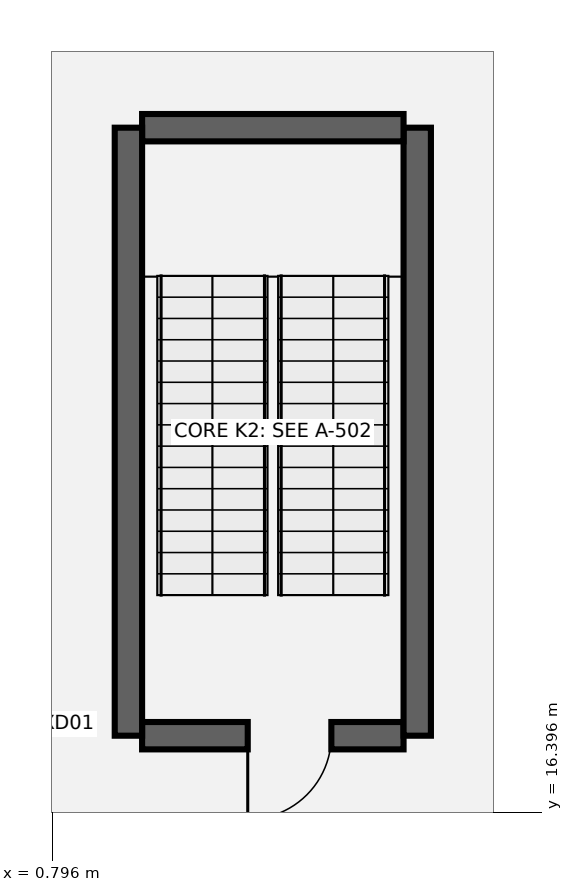
"""IFC4 building model, lengths in metres.
Left out: names, types, materials, properties, quantities, classifications, styles, units other than length and angle.
Written with IfcOpenShell. Run it as: python <this file> out.ifc"""

import sys

from ifc_helpers import new_model, si_unit, direction, frame, frame_2d, origin, place, context, subcontext, project, spatial, rectangle, extrude, element, fill, save


model = new_model("IFC4")
c1 = context("Model", 3, precision=1e-05, world=origin(), true_north=direction((0.0, 1.0)))
c2 = subcontext(c1, "Body", "Model", "MODEL_VIEW")
j1 = project(units=[si_unit("LENGTHUNIT", "METRE"), si_unit("PLANEANGLEUNIT", "RADIAN")], contexts=[c1])
p1 = place(None, origin())
s1 = spatial("IfcSite", under=j1, at=p1, CompositionType="ELEMENT")
p2 = place(p1, origin())
s2 = spatial("IfcBuilding", under=s1, at=p2, CompositionType="ELEMENT")
p3 = place(p2, origin())
s3 = spatial("IfcBuildingStorey", under=s2, at=p3, CompositionType="ELEMENT", Elevation=0.0)
p4 = place(p3, frame((5.42, 17.4, 0.0), z_axis=(0.0, 0.0, 1.0), x_axis=(-1.0, 0.0, 0.0)))
e1 = element("IfcWall", 1, at=p4, inside=s3, PredefinedType="SHEAR", context=c2, shape_type="SweptSolid", body=[
    extrude(rectangle(XDim=3.44, YDim=0.36, at=frame_2d((1.72, 0.0))), origin(), (0.0, 0.0, 1.0), 5.12),
])
p5 = place(p4, frame((0.95, 0.0, 0.0)))
e2 = element("IfcOpeningElement", 2, at=p5, cuts=e1, PredefinedType="OPENING", context=c2, shape_type="SweptSolid", body=[
    extrude(rectangle(XDim=1.1, YDim=2.15, at=frame_2d((0.55, 1.075))), frame((0.0, 0.19, 0.0), z_axis=(0.0, -1.0, 0.0), x_axis=(1.0, 0.0, 0.0)), (0.0, 0.0, 1.0), 0.38),
])
p6 = place(p3, frame((5.6, 17.4, 0.0), z_axis=(0.0, 0.0, 1.0), x_axis=(0.0, 1.0, 0.0)))
e3 = element("IfcWall", 3, at=p6, inside=s3, PredefinedType="SHEAR", context=c2, shape_type="SweptSolid", body=[
    extrude(rectangle(XDim=8.0, YDim=0.36, at=frame_2d((4.0, 0.0))), origin(), (0.0, 0.0, 1.0), 5.12),
])
p7 = place(p3, frame((5.42, 25.4, 0.0), z_axis=(0.0, 0.0, 1.0), x_axis=(-1.0, 0.0, 0.0)))
e4 = element("IfcWall", 4, at=p7, inside=s3, PredefinedType="SHEAR", context=c2, shape_type="SweptSolid", body=[
    extrude(rectangle(XDim=3.44, YDim=0.36, at=frame_2d((1.72, 0.0))), origin(), (0.0, 0.0, 1.0), 5.12),
])
p8 = place(p3, frame((1.8, 25.4, 0.0), z_axis=(0.0, 0.0, 1.0), x_axis=(0.0, -1.0, 0.0)))
e5 = element("IfcWall", 5, at=p8, inside=s3, PredefinedType="SHEAR", context=c2, shape_type="SweptSolid", body=[
    extrude(rectangle(XDim=8.0, YDim=0.36, at=frame_2d((4.0, 0.0))), origin(), (0.0, 0.0, 1.0), 5.12),
])
p9 = place(p5, origin())
e6 = element("IfcDoor", 6, at=p9, inside=s3, OperationType="SINGLE_SWING_RIGHT", PredefinedType="DOOR", context=c2, shape_type="SweptSolid", body=[
    extrude(rectangle(XDim=1.1, YDim=2.15, at=frame_2d((0.55, 1.075))), frame((0.0, 0.025, 0.0), z_axis=(0.0, -1.0, 0.0), x_axis=(1.0, 0.0, 0.0)), (0.0, 0.0, 1.0), 0.05),
])
fill(e2, e6)
save(model, sys.argv[1])
